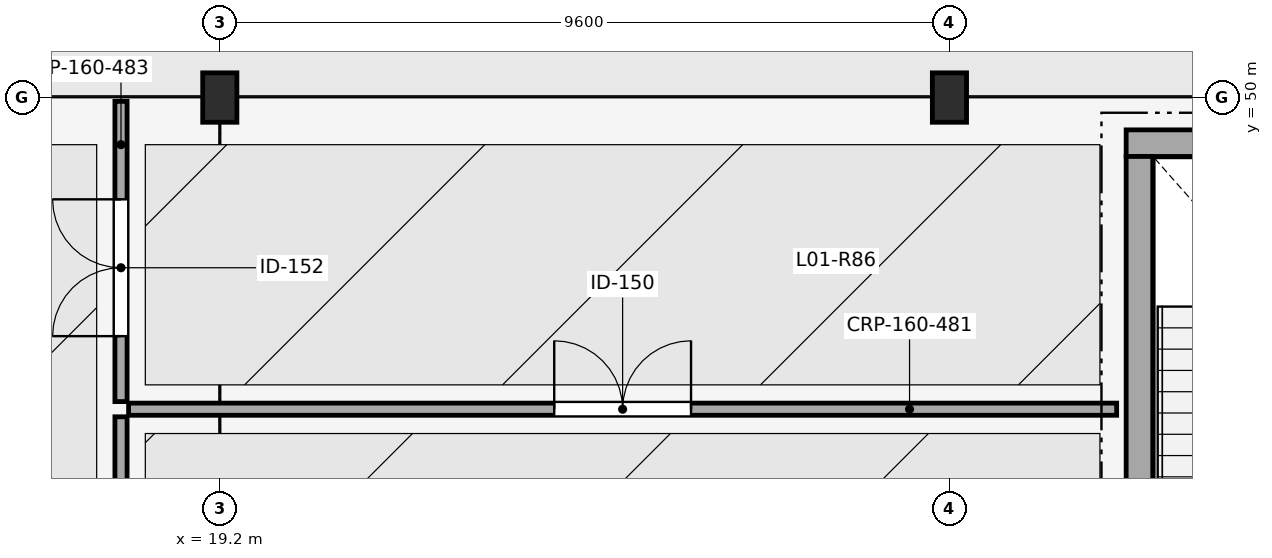
"""IFC4 building model, lengths in metres.
Left out: names, types, materials, properties, quantities, classifications, styles, units other than length and angle.
Written with IfcOpenShell. Run it as: python <this file> out.ifc"""

import sys

from ifc_helpers import new_model, si_unit, direction, frame, frame_2d, origin, origin_2d, place, context, subcontext, project, spatial, rectangle, extrude, element, fill, save


model = new_model("IFC4")
c1 = context("Model", 3, precision=1e-05, world=origin(), true_north=direction((0.0, 1.0)))
c2 = subcontext(c1, "Body", "Model", "MODEL_VIEW")
j1 = project(units=[si_unit("LENGTHUNIT", "METRE"), si_unit("PLANEANGLEUNIT", "RADIAN")], contexts=[c1])
p1 = place(None, origin())
s1 = spatial("IfcSite", under=j1, at=p1, CompositionType="ELEMENT")
p2 = place(p1, origin())
s2 = spatial("IfcBuilding", under=s1, at=p2, CompositionType="ELEMENT")
p3 = place(p2, frame((0.0, 0.0, 4.8)))
s3 = spatial("IfcBuildingStorey", under=s2, at=p3, CompositionType="ELEMENT", Elevation=4.8)
for number, where, z_axis, x_axis in (
    (1, (19.2, 50.0, 0.0), (0.0, 0.0, 1.0), (1.0, 0.0, 0.0)),
    (2, (28.8, 50.0, 0.0), (0.0, 0.0, 1.0), (1.0, 0.0, 0.0)),
):
    element("IfcColumn", number, at=place(p3, frame(where, z_axis=z_axis, x_axis=x_axis)), inside=s3, PredefinedType="COLUMN", context=c2, shape_type="SweptSolid", body=[
        extrude(rectangle(XDim=0.45, YDim=0.65, at=origin_2d()), origin(), (0.0, 0.0, 1.0), 4.8),
    ])
p4 = place(p3, frame((31.125, 49.4, 0.0), z_axis=(0.0, 0.0, 1.0), x_axis=(1.0, 0.0, 0.0)))
e3 = element("IfcWall", 3, at=p4, inside=s3, PredefinedType="SHEAR", context=c2, shape_type="SweptSolid", body=[
    extrude(rectangle(XDim=5.65, YDim=0.35, at=frame_2d((2.825, 0.0))), origin(), (0.0, 0.0, 1.0), 4.55),
])
p5 = place(p3, frame((31.3, 41.275, 0.0), z_axis=(0.0, 0.0, 1.0), x_axis=(0.0, 1.0, 0.0)))
e4 = element("IfcWall", 4, at=p5, inside=s3, PredefinedType="SHEAR", context=c2, shape_type="SweptSolid", body=[
    extrude(rectangle(XDim=7.95, YDim=0.35, at=frame_2d((3.975, 0.0))), origin(), (0.0, 0.0, 1.0), 4.55),
])
p6 = place(p5, frame((0.22, 0.0, 0.0)))
e5 = element("IfcOpeningElement", 5, at=p6, cuts=e4, PredefinedType="OPENING", context=c2, shape_type="SweptSolid", body=[
    extrude(rectangle(XDim=2.05, YDim=2.15, at=frame_2d((1.025, 1.075))), frame((0.0, 0.185, 0.0), z_axis=(0.0, -1.0, 0.0), x_axis=(1.0, 0.0, 0.0)), (0.0, 0.0, 1.0), 0.37),
])
p7 = place(p3, frame((18.0, 45.9, 0.0), z_axis=(0.0, 0.0, 1.0), x_axis=(1.0, 0.0, 0.0)))
e6 = element("IfcWall", 6, at=p7, inside=s3, PredefinedType="PARTITIONING", context=c2, shape_type="SweptSolid", body=[
    extrude(rectangle(XDim=13.0, YDim=0.16, at=frame_2d((6.5, 0.0))), origin(), (0.0, 0.0, 1.0), 4.42),
])
p8 = place(p7, frame((5.6, 0.0, 0.0)))
e7 = element("IfcOpeningElement", 7, at=p8, cuts=e6, PredefinedType="OPENING", context=c2, shape_type="SweptSolid", body=[
    extrude(rectangle(XDim=1.8, YDim=2.15, at=frame_2d((0.9, 1.075))), frame((0.0, 0.09, 0.0), z_axis=(0.0, -1.0, 0.0), x_axis=(1.0, 0.0, 0.0)), (0.0, 0.0, 1.0), 0.18),
])
p9 = place(p3, frame((17.9, 34.3, 0.0), z_axis=(0.0, 0.0, 1.0), x_axis=(0.0, 1.0, 0.0)))
e8 = element("IfcWall", 8, at=p9, inside=s3, PredefinedType="PARTITIONING", context=c2, shape_type="SweptSolid", body=[
    extrude(rectangle(XDim=11.5, YDim=0.16, at=frame_2d((5.75, 0.0))), origin(), (0.0, 0.0, 1.0), 4.42),
])
p10 = place(p9, frame((3.952, 0.0, 0.0)))
e9 = element("IfcOpeningElement", 9, at=p10, cuts=e8, PredefinedType="OPENING", context=c2, shape_type="SweptSolid", body=[
    extrude(rectangle(XDim=1.8, YDim=2.15, at=frame_2d((0.9, 1.075))), frame((0.0, 0.09, 0.0), z_axis=(0.0, -1.0, 0.0), x_axis=(1.0, 0.0, 0.0)), (0.0, 0.0, 1.0), 0.18),
])
p11 = place(p3, frame((17.9, 46.0, 0.0), z_axis=(0.0, 0.0, 1.0), x_axis=(0.0, 1.0, 0.0)))
e10 = element("IfcWall", 10, at=p11, inside=s3, PredefinedType="PARTITIONING", context=c2, shape_type="SweptSolid", body=[
    extrude(rectangle(XDim=3.95, YDim=0.16, at=frame_2d((1.975, 0.0))), origin(), (0.0, 0.0, 1.0), 4.42),
])
p12 = place(p11, frame((0.861, 0.0, 0.0)))
e11 = element("IfcOpeningElement", 11, at=p12, cuts=e10, PredefinedType="OPENING", context=c2, shape_type="SweptSolid", body=[
    extrude(rectangle(XDim=1.8, YDim=2.15, at=frame_2d((0.9, 1.075))), frame((0.0, 0.09, 0.0), z_axis=(0.0, -1.0, 0.0), x_axis=(1.0, 0.0, 0.0)), (0.0, 0.0, 1.0), 0.18),
])
p13 = place(p8, origin())
e12 = element("IfcDoor", 12, at=p13, inside=s3, OperationType="DOUBLE_DOOR_SINGLE_SWING", PredefinedType="DOOR", context=c2, shape_type="SweptSolid", body=[
    extrude(rectangle(XDim=1.8, YDim=2.15, at=frame_2d((0.9, 1.075))), frame((0.0, 0.025, 0.0), z_axis=(0.0, -1.0, 0.0), x_axis=(1.0, 0.0, 0.0)), (0.0, 0.0, 1.0), 0.05),
])
fill(e7, e12)
p14 = place(p12, origin())
e13 = element("IfcDoor", 13, at=p14, inside=s3, OperationType="DOUBLE_DOOR_SINGLE_SWING", PredefinedType="DOOR", context=c2, shape_type="SweptSolid", body=[
    extrude(rectangle(XDim=1.8, YDim=2.15, at=frame_2d((0.9, 1.075))), frame((0.0, 0.025, 0.0), z_axis=(0.0, -1.0, 0.0), x_axis=(1.0, 0.0, 0.0)), (0.0, 0.0, 1.0), 0.05),
])
fill(e11, e13)
save(model, sys.argv[1])
